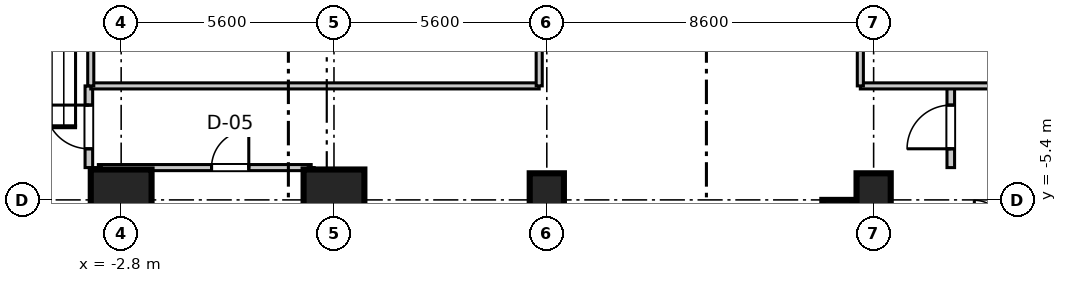
"""IFC4 building model, lengths in metres.
Left out: names, types, materials, properties, quantities, classifications, styles, units other than length and angle.
Written with IfcOpenShell. Run it as: python <this file> out.ifc"""

import sys

from ifc_helpers import new_model, si_unit, direction, frame, frame_2d, origin, origin_2d, place, context, subcontext, project, spatial, rectangle, extrude, source, transform, mapped, element, fill, save


model = new_model("IFC4")
c1 = context("Model", 3, precision=1e-05, world=origin(), true_north=direction((0.0, 1.0)))
c2 = subcontext(c1, "Body", "Model", "MODEL_VIEW")
j1 = project(units=[si_unit("LENGTHUNIT", "METRE"), si_unit("PLANEANGLEUNIT", "RADIAN")], contexts=[c1])
p1 = place(None, origin())
s1 = spatial("IfcSite", under=j1, at=p1, CompositionType="ELEMENT")
p2 = place(p1, origin())
s2 = spatial("IfcBuilding", under=s1, at=p2, CompositionType="ELEMENT")
p3 = place(p2, origin())
s3 = spatial("IfcBuildingStorey", under=s2, at=p3, CompositionType="ELEMENT", Elevation=0.0)
m1 = source(origin(), c2, "Body", "SweptSolid", [
    extrude(rectangle(XDim=1.6, YDim=1.6, at=origin_2d()), origin(), (0.0, 0.0, 1.0), 5.355),
])
for number, where, z_axis, x_axis in (
    (1, (-2.8, -5.4, 0.0), (0.0, 0.0, 1.0), (1.0, 0.0, 0.0)),
    (2, (2.8, -5.4, 0.0), (0.0, 0.0, 1.0), (1.0, 0.0, 0.0)),
):
    element("IfcColumn", number, at=place(p3, frame(where, z_axis=z_axis, x_axis=x_axis)), inside=s3, PredefinedType="COLUMN", context=c2, shape_type="MappedRepresentation", body=[
        mapped(m1, transform((0.0, 0.0, 0.0), scale=1.0)),
    ])
m2 = source(origin(), c2, "Body", "SweptSolid", [
    extrude(rectangle(XDim=0.9, YDim=1.4, at=origin_2d()), origin(), (0.0, 0.0, 1.0), 5.355),
])
for number, where, z_axis, x_axis in (
    (3, (8.4, -5.4, 0.0), (0.0, 0.0, 1.0), (1.0, 0.0, 0.0)),
    (4, (17.0, -5.4, 0.0), (0.0, 0.0, 1.0), (1.0, 0.0, 0.0)),
):
    element("IfcColumn", number, at=place(p3, frame(where, z_axis=z_axis, x_axis=x_axis)), inside=s3, PredefinedType="PILASTER", context=c2, shape_type="MappedRepresentation", body=[
        mapped(m2, transform((0.0, 0.0, 0.0), scale=1.0)),
    ])
m3 = source(origin(), c2, "Body", "SweptSolid", [
    extrude(rectangle(XDim=11.6, YDim=0.8, at=frame_2d((5.8, 0.0))), origin(), (0.0, 0.0, 1.0), 5.08),
])
p4 = place(p3, frame((16.05, -17.0, 0.0), z_axis=(0.0, 0.0, 1.0), x_axis=(0.0, 1.0, 0.0)))
e5 = element("IfcWall", 5, at=p4, inside=s3, PredefinedType="SHEAR", context=c2, shape_type="MappedRepresentation", body=[
    mapped(m3, transform((0.0, 0.0, 0.0), scale=1.0)),
])
m4 = source(origin(), c2, "Body", "SweptSolid", [
    extrude(rectangle(XDim=2.15, YDim=0.2, at=frame_2d((1.075, 0.0))), origin(), (0.0, 0.0, 1.0), 3.4),
])
p5 = place(p3, frame((-3.65, -4.55, 0.0), z_axis=(0.0, 0.0, 1.0), x_axis=(0.0, 1.0, 0.0)))
e6 = element("IfcWall", 6, at=p5, inside=s3, PredefinedType="PARTITIONING", context=c2, shape_type="MappedRepresentation", body=[
    mapped(m4, transform((0.0, 0.0, 0.0), scale=1.0)),
])
p6 = place(p5, frame((0.495, 0.0, 0.0)))
e7 = element("IfcOpeningElement", 7, at=p6, cuts=e6, PredefinedType="OPENING", context=c2, shape_type="SweptSolid", body=[
    extrude(rectangle(XDim=1.15, YDim=2.15, at=frame_2d((0.575, 1.075))), frame((0.0, 0.11, 0.0), z_axis=(0.0, -1.0, 0.0), x_axis=(1.0, 0.0, 0.0)), (0.0, 0.0, 1.0), 0.22),
])
p7 = place(p3, frame((19.03, -4.55, 0.0), z_axis=(0.0, 0.0, 1.0), x_axis=(0.0, 1.0, 0.0)))
e8 = element("IfcWall", 8, at=p7, inside=s3, PredefinedType="PARTITIONING", context=c2, shape_type="MappedRepresentation", body=[
    mapped(m4, transform((0.0, 0.0, 0.0), scale=1.0)),
])
p8 = place(p7, frame((0.495, 0.0, 0.0)))
e9 = element("IfcOpeningElement", 9, at=p8, cuts=e8, PredefinedType="OPENING", context=c2, shape_type="SweptSolid", body=[
    extrude(rectangle(XDim=1.15, YDim=2.15, at=frame_2d((0.575, 1.075))), frame((0.0, 0.11, 0.0), z_axis=(0.0, -1.0, 0.0), x_axis=(1.0, 0.0, 0.0)), (0.0, 0.0, 1.0), 0.22),
])
m5 = source(origin(), c2, "Body", "SweptSolid", [
    extrude(rectangle(XDim=11.8, YDim=0.16, at=frame_2d((5.9, 0.0))), origin(), (0.0, 0.0, 1.0), 3.4),
])
p9 = place(p3, frame((-3.6, -2.4, 0.0), z_axis=(0.0, 0.0, 1.0), x_axis=(1.0, 0.0, 0.0)))
e10 = element("IfcWall", 10, at=p9, inside=s3, PredefinedType="PARTITIONING", context=c2, shape_type="MappedRepresentation", body=[
    mapped(m5, transform((0.0, 0.0, 0.0), scale=1.0)),
])
m6 = source(origin(), c2, "Body", "SweptSolid", [
    extrude(rectangle(XDim=4.8, YDim=0.16, at=frame_2d((2.4, 0.0))), origin(), (0.0, 0.0, 1.0), 3.4),
])
for number, where, z_axis, x_axis in (
    (11, (-3.6, -2.4, 0.0), (0.0, 0.0, 1.0), (0.0, 1.0, 0.0)),
    (12, (8.2, -2.4, 0.0), (0.0, 0.0, 1.0), (0.0, 1.0, 0.0)),
):
    element("IfcWall", number, at=place(p3, frame(where, z_axis=z_axis, x_axis=x_axis)), inside=s3, PredefinedType="PARTITIONING", context=c2, shape_type="MappedRepresentation", body=[
        mapped(m6, transform((0.0, 0.0, 0.0), scale=1.0)),
    ])
m7 = source(origin(), c2, "Body", "SweptSolid", [
    extrude(rectangle(XDim=20.15, YDim=0.16, at=frame_2d((10.075, 0.0))), origin(), (0.0, 0.0, 1.0), 3.4),
])
p10 = place(p3, frame((16.65, -2.4, 0.0), z_axis=(0.0, 0.0, 1.0), x_axis=(1.0, 0.0, 0.0)))
e13 = element("IfcWall", 13, at=p10, inside=s3, PredefinedType="PARTITIONING", context=c2, shape_type="MappedRepresentation", body=[
    mapped(m7, transform((0.0, 0.0, 0.0), scale=1.0)),
])
p11 = place(p3, frame((16.65, -2.4, 0.0), z_axis=(0.0, 0.0, 1.0), x_axis=(0.0, 1.0, 0.0)))
e14 = element("IfcWall", 14, at=p11, inside=s3, PredefinedType="PARTITIONING", context=c2, shape_type="MappedRepresentation", body=[
    mapped(m6, transform((0.0, 0.0, 0.0), scale=1.0)),
])
p12 = place(p11, frame((1.65, 0.0, 0.0)))
e15 = element("IfcOpeningElement", 15, at=p12, cuts=e14, PredefinedType="OPENING", context=c2, shape_type="SweptSolid", body=[
    extrude(rectangle(XDim=1.5, YDim=2.15, at=frame_2d((0.75, 1.075))), frame((0.0, 0.09, 0.0), z_axis=(0.0, -1.0, 0.0), x_axis=(1.0, 0.0, 0.0)), (0.0, 0.0, 1.0), 0.18),
])
m8 = source(origin(), c2, "Body", "SweptSolid", [
    extrude(rectangle(XDim=5.6, YDim=0.16, at=frame_2d((2.8, 0.0))), origin(), (0.0, 0.0, 1.0), 3.4),
])
p13 = place(p3, frame((-3.4, -4.55, 0.0), z_axis=(0.0, 0.0, 1.0), x_axis=(1.0, 0.0, 0.0)))
e16 = element("IfcWall", 16, at=p13, inside=s3, PredefinedType="PARTITIONING", context=c2, shape_type="MappedRepresentation", body=[
    mapped(m8, transform((0.0, 0.0, 0.0), scale=1.0)),
])
p14 = place(p13, frame((2.978, 0.0, 0.0)))
e17 = element("IfcOpeningElement", 17, at=p14, cuts=e16, PredefinedType="OPENING", context=c2, shape_type="SweptSolid", body=[
    extrude(rectangle(XDim=0.98, YDim=2.1, at=frame_2d((0.49, 1.05))), frame((0.0, 0.09, 0.0), z_axis=(0.0, -1.0, 0.0), x_axis=(1.0, 0.0, 0.0)), (0.0, 0.0, 1.0), 0.18),
])
m9 = source(origin(), c2, "Body", "SweptSolid", [
    extrude(rectangle(XDim=6.95, YDim=0.16, at=frame_2d((3.475, 0.0))), origin(), (0.0, 0.0, 1.0), 3.4),
])
for number, where, z_axis, x_axis in (
    (18, (-3.4, -11.5, 0.0), (0.0, 0.0, 1.0), (0.0, 1.0, 0.0)),
    (19, (2.2, -11.5, 0.0), (0.0, 0.0, 1.0), (0.0, 1.0, 0.0)),
):
    element("IfcWall", number, at=place(p3, frame(where, z_axis=z_axis, x_axis=x_axis)), inside=s3, PredefinedType="PARTITIONING", context=c2, shape_type="MappedRepresentation", body=[
        mapped(m9, transform((0.0, 0.0, 0.0), scale=1.0)),
    ])
m10 = source(origin(), c2, "Body", "SweptSolid", [
    extrude(rectangle(XDim=1.15, YDim=2.15, at=frame_2d((0.575, 1.075))), frame((0.0, 0.025, 0.0), z_axis=(0.0, -1.0, 0.0), x_axis=(1.0, 0.0, 0.0)), (0.0, 0.0, 1.0), 0.05),
])
p15 = place(p6, origin())
e20 = element("IfcDoor", 20, at=p15, inside=s3, OperationType="SINGLE_SWING_RIGHT", PredefinedType="DOOR", context=c2, shape_type="MappedRepresentation", body=[
    mapped(m10, transform((0.0, 0.0, 0.0), scale=1.0)),
])
fill(e7, e20)
p16 = place(p8, frame((1.15, 0.0, 0.0), z_axis=(0.0, 0.0, 1.0), x_axis=(-1.0, 0.0, 0.0)))
e21 = element("IfcDoor", 21, at=p16, inside=s3, OperationType="SINGLE_SWING_LEFT", PredefinedType="DOOR", context=c2, shape_type="MappedRepresentation", body=[
    mapped(m10, transform((0.0, 0.0, 0.0), scale=1.0)),
])
fill(e9, e21)
m11 = source(origin(), c2, "Body", "SweptSolid", [
    extrude(rectangle(XDim=0.98, YDim=2.1, at=frame_2d((0.49, 1.05))), frame((0.0, 0.025, 0.0), z_axis=(0.0, -1.0, 0.0), x_axis=(1.0, 0.0, 0.0)), (0.0, 0.0, 1.0), 0.05),
])
p17 = place(p14, frame((0.98, 0.0, 0.0), z_axis=(0.0, 0.0, 1.0), x_axis=(-1.0, 0.0, 0.0)))
e22 = element("IfcDoor", 22, at=p17, inside=s3, OperationType="SINGLE_SWING_RIGHT", PredefinedType="DOOR", context=c2, shape_type="MappedRepresentation", body=[
    mapped(m11, transform((0.0, 0.0, 0.0), scale=1.0)),
])
fill(e17, e22)
save(model, sys.argv[1])
